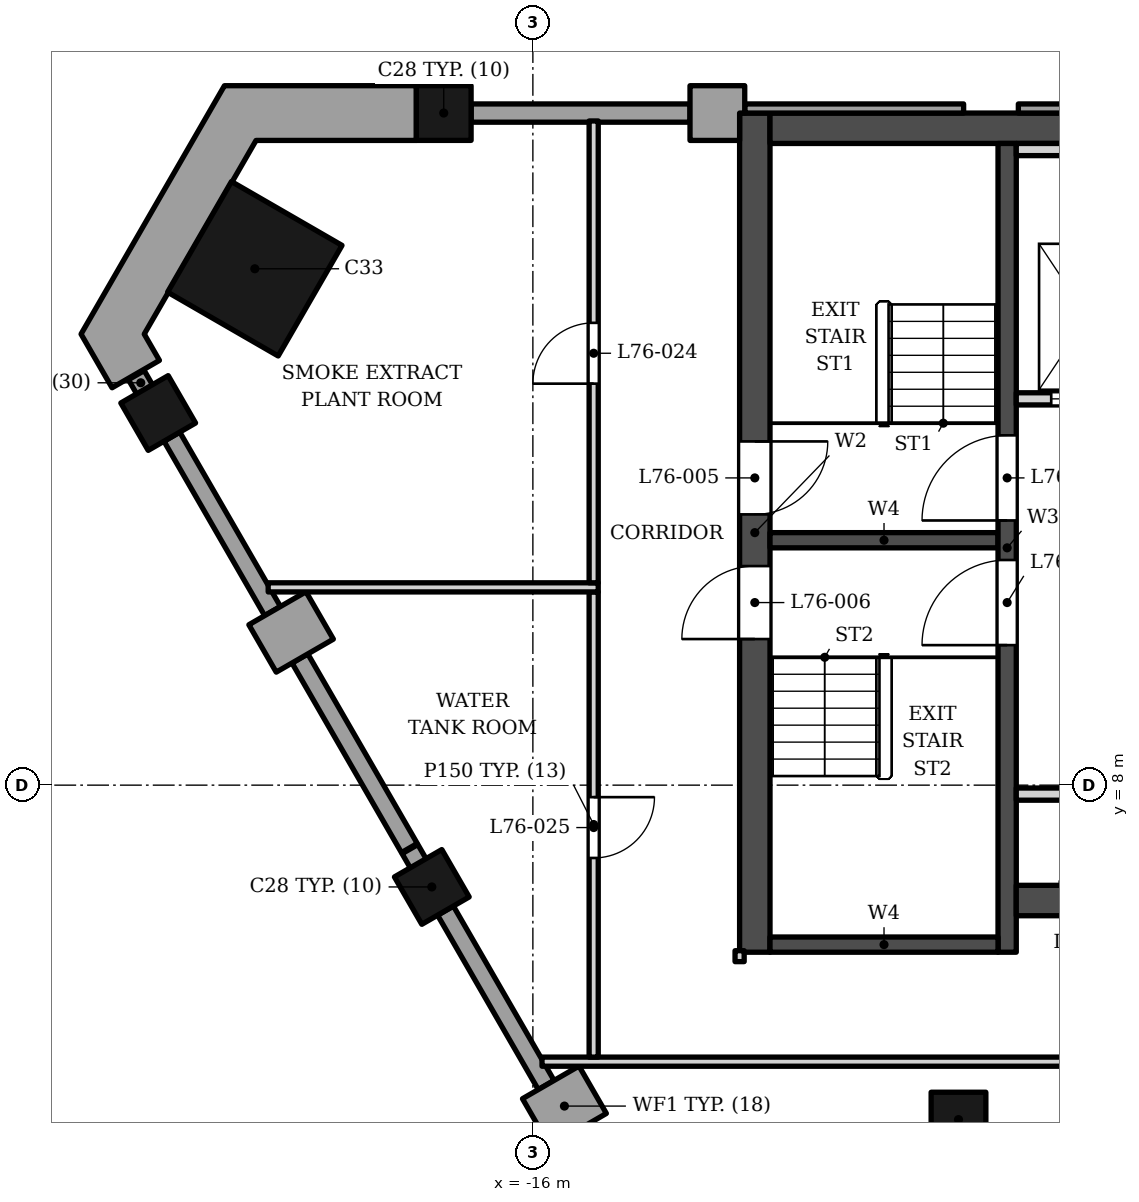
"""IFC4 building model, lengths in metres.
Left out: names, types, materials, properties, quantities, classifications, styles, units other than length and angle.
Written with IfcOpenShell. Run it as: python <this file> out.ifc"""

import sys

from ifc_helpers import new_model, si_unit, direction, frame, frame_2d, origin, origin_2d, place, context, subcontext, project, spatial, polyline, rectangle, outline, extrude, element, fill, save


model = new_model("IFC4")
c1 = context("Model", 3, precision=1e-05, world=origin(), true_north=direction((0.0, 1.0)))
c2 = subcontext(c1, "Body", "Model", "MODEL_VIEW")
j1 = project(units=[si_unit("LENGTHUNIT", "METRE"), si_unit("PLANEANGLEUNIT", "RADIAN")], contexts=[c1])
p1 = place(None, origin())
s1 = spatial("IfcSite", under=j1, at=p1, CompositionType="ELEMENT")
p2 = place(p1, origin())
s2 = spatial("IfcBuilding", under=s1, at=p2, CompositionType="ELEMENT")
p3 = place(p2, frame((0.0, 0.0, 325.5)))
s3 = spatial("IfcBuildingStorey", under=s2, at=p3, CompositionType="ELEMENT", Elevation=325.5)
p4 = place(p3, frame((-12.1, 18.802, 0.0), z_axis=(0.0, 0.0, 1.0), x_axis=(1.0, 0.0, 0.0)))
e1 = element("IfcWall", 1, at=p4, inside=s3, PredefinedType="SHEAR", context=c2, shape_type="SweptSolid", body=[
    extrude(rectangle(XDim=24.2, YDim=0.5, at=frame_2d((12.1, 0.0))), origin(), (0.0, 0.0, 1.0), 5.0),
])
p5 = place(p3, frame((-12.35, 5.253, 0.0), z_axis=(0.0, 0.0, 1.0), x_axis=(0.0, 1.0, 0.0)))
e2 = element("IfcWall", 2, at=p5, inside=s3, PredefinedType="SHEAR", context=c2, shape_type="SweptSolid", body=[
    extrude(rectangle(XDim=13.8, YDim=0.5, at=frame_2d((6.9, 0.0))), origin(), (0.0, 0.0, 1.0), 5.0),
])
p6 = place(p5, frame((7.2, 0.0, 0.0)))
e3 = element("IfcOpeningElement", 3, at=p6, cuts=e2, PredefinedType="OPENING", context=c2, shape_type="SweptSolid", body=[
    extrude(rectangle(XDim=1.2, YDim=2.1, at=frame_2d((0.6, 1.05))), frame((0.0, 0.26, 0.0), z_axis=(0.0, -1.0, 0.0), x_axis=(1.0, 0.0, 0.0)), (0.0, 0.0, 1.0), 0.52),
])
p7 = place(p5, frame((5.15, 0.0, 0.0)))
e4 = element("IfcOpeningElement", 4, at=p7, cuts=e2, PredefinedType="OPENING", context=c2, shape_type="SweptSolid", body=[
    extrude(rectangle(XDim=1.2, YDim=2.1, at=frame_2d((0.6, 1.05))), frame((0.0, 0.26, 0.0), z_axis=(0.0, -1.0, 0.0), x_axis=(1.0, 0.0, 0.0)), (0.0, 0.0, 1.0), 0.52),
])
p8 = place(p3, frame((-8.2, 5.253, 0.0), z_axis=(0.0, 0.0, 1.0), x_axis=(0.0, 1.0, 0.0)))
e5 = element("IfcWall", 5, at=p8, inside=s3, PredefinedType="SHEAR", context=c2, shape_type="SweptSolid", body=[
    extrude(rectangle(XDim=13.3, YDim=0.3, at=frame_2d((6.65, 0.0))), origin(), (0.0, 0.0, 1.0), 5.0),
])
p9 = place(p8, frame((7.1, 0.0, 0.0)))
e6 = element("IfcOpeningElement", 6, at=p9, cuts=e5, PredefinedType="OPENING", context=c2, shape_type="SweptSolid", body=[
    extrude(rectangle(XDim=1.4, YDim=2.1, at=frame_2d((0.7, 1.05))), frame((0.0, 0.16, 0.0), z_axis=(0.0, -1.0, 0.0), x_axis=(1.0, 0.0, 0.0)), (0.0, 0.0, 1.0), 0.32),
])
p10 = place(p8, frame((5.05, 0.0, 0.0)))
e7 = element("IfcOpeningElement", 7, at=p10, cuts=e5, PredefinedType="OPENING", context=c2, shape_type="SweptSolid", body=[
    extrude(rectangle(XDim=1.4, YDim=2.1, at=frame_2d((0.7, 1.05))), frame((0.0, 0.16, 0.0), z_axis=(0.0, -1.0, 0.0), x_axis=(1.0, 0.0, 0.0)), (0.0, 0.0, 1.0), 0.32),
])
for number, where, z_axis, x_axis in (
    (8, (-12.1, 12.028, 0.0), (0.0, 0.0, 1.0), (1.0, 0.0, 0.0)),
    (9, (-12.1, 5.378, 0.0), (0.0, 0.0, 1.0), (1.0, 0.0, 0.0)),
):
    element("IfcWall", number, at=place(p3, frame(where, z_axis=z_axis, x_axis=x_axis)), inside=s3, PredefinedType="SHEAR", context=c2, shape_type="SweptSolid", body=[
        extrude(rectangle(XDim=3.75, YDim=0.25, at=frame_2d((1.875, 0.0))), origin(), (0.0, 0.0, 1.0), 5.0),
    ])
p11 = place(p3, frame((-8.05, 6.103, 0.0), z_axis=(0.0, 0.0, 1.0), x_axis=(1.0, 0.0, 0.0)))
e10 = element("IfcWall", 10, at=p11, inside=s3, PredefinedType="SHEAR", context=c2, shape_type="SweptSolid", body=[
    extrude(rectangle(XDim=7.05, YDim=0.5, at=frame_2d((3.525, 0.0))), origin(), (0.0, 0.0, 1.0), 5.0),
])
p12 = place(p11, frame((0.825, 0.0, 0.0)))
e11 = element("IfcOpeningElement", 11, at=p12, cuts=e10, PredefinedType="OPENING", context=c2, shape_type="SweptSolid", body=[
    extrude(rectangle(XDim=0.9, YDim=2.1, at=frame_2d((0.45, 1.05))), frame((0.0, 0.26, 0.0), z_axis=(0.0, -1.0, 0.0), x_axis=(1.0, 0.0, 0.0)), (0.0, 0.0, 1.0), 0.52),
])
p13 = place(p3, frame((-20.573, 16.492, 0.0), z_axis=(0.0, 0.0, 1.0), x_axis=(0.866025395058, -0.500000015115, 0.0)))
e12 = element("IfcColumn", 12, at=p13, inside=s3, PredefinedType="COLUMN", context=c2, shape_type="SweptSolid", body=[
    extrude(rectangle(XDim=2.1, YDim=2.1, at=origin_2d()), origin(), (0.0, 0.0, 1.0), 5.0),
])
for number, where, z_axis, x_axis in (
    (13, (-9.0, 2.5, 0.0), (0.0, 0.0, 1.0), (1.0, 0.0, 0.0)),
    (14, (-22.162, 14.12, 0.0), (0.0, 0.0, 1.0), (0.5, -0.866, 0.0)),
    (15, (-17.662, 6.326, 0.0), (0.0, 0.0, 1.0), (0.5, -0.866, 0.0)),
    (16, (-17.466, 19.053, 0.0), (0.0, 0.0, 1.0), (-1.0, 0.0, 0.0)),
):
    element("IfcColumn", number, at=place(p3, frame(where, z_axis=z_axis, x_axis=x_axis)), inside=s3, PredefinedType="COLUMN", context=c2, shape_type="SweptSolid", body=[
        extrude(rectangle(XDim=0.9, YDim=0.9, at=origin_2d()), origin(), (0.0, 0.0, 1.0), 5.0),
    ])
p14 = place(p3, frame((-20.446, 10.248, 0.0), z_axis=(0.0, 0.0, 1.0), x_axis=(0.866103179807, 0.499865263774, 0.0)))
e17 = element("IfcWall", 17, at=p14, inside=s3, PredefinedType="SOLIDWALL", context=c2, shape_type="SweptSolid", body=[
    extrude(rectangle(XDim=1.085, YDim=0.9, at=frame_2d((0.542, 0.0))), origin(), (0.0, 0.0, 1.0), 3.8),
])
p15 = place(p3, frame((-15.946, 2.454, 0.0), z_axis=(0.0, 0.0, 1.0), x_axis=(0.86613636825, 0.499807754637, 0.0)))
e18 = element("IfcWall", 18, at=p15, inside=s3, PredefinedType="SOLIDWALL", context=c2, shape_type="SweptSolid", body=[
    extrude(rectangle(XDim=1.074, YDim=0.9, at=frame_2d((0.537, 0.0))), origin(), (0.0, 0.0, 1.0), 3.8),
])
p16 = place(p3, origin())
e19 = element("IfcWall", 19, at=p16, inside=s3, PredefinedType="ELEMENTEDWALL", context=c2, shape_type="SweptSolid", body=[
    extrude(outline(polyline([(-20.151, 10.938), (-21.807, 13.805), (-22.067, 13.655), (-20.411, 10.788), (-20.151, 10.938)])), origin(), (0.0, 0.0, 1.0), 3.8),
])
p17 = place(p3, frame((-19.831, 10.083, 0.0), z_axis=(0.0, 0.0, 1.0), x_axis=(0.500012057535, -0.866018442252, 0.0)))
e20 = element("IfcWall", 20, at=p17, inside=s3, PredefinedType="ELEMENTEDWALL", context=c2, shape_type="SweptSolid", body=[
    extrude(rectangle(XDim=3.6, YDim=0.3, at=frame_2d((1.8, 0.0))), origin(), (0.0, 0.0, 1.0), 3.8),
])
p18 = place(p3, origin())
e21 = element("IfcWall", 21, at=p18, inside=s3, PredefinedType="ELEMENTEDWALL", context=c2, shape_type="SweptSolid", body=[
    extrude(outline(polyline([(-15.651, 3.144), (-17.307, 6.011), (-17.567, 5.861), (-15.911, 2.994), (-15.651, 3.144)])), origin(), (0.0, 0.0, 1.0), 3.8),
])
p19 = place(p3, origin())
e22 = element("IfcWall", 22, at=p19, inside=s3, PredefinedType="SOLIDWALL", context=c2, shape_type="SweptSolid", body=[
    extrude(outline(polyline([(-13.416, 19.502), (-13.416, 18.603), (-12.6, 18.603), (-12.6, 19.052), (-12.516, 19.052), (-12.516, 19.502), (-13.416, 19.502)])), origin(), (0.0, 0.0, 1.0), 3.8),
])
p20 = place(p3, origin())
e23 = element("IfcWall", 23, at=p20, inside=s3, PredefinedType="ELEMENTEDWALL", context=c2, shape_type="SweptSolid", body=[
    extrude(outline(polyline([(-4.416, 19.203), (-8.016, 19.203), (-8.016, 19.052), (-4.416, 19.052), (-4.416, 19.203)])), origin(), (0.0, 0.0, 1.0), 3.8),
])
p21 = place(p3, origin())
e24 = element("IfcWall", 24, at=p21, inside=s3, PredefinedType="ELEMENTEDWALL", context=c2, shape_type="SweptSolid", body=[
    extrude(outline(polyline([(-8.916, 19.203), (-12.516, 19.203), (-12.516, 19.052), (-8.916, 19.052), (-8.916, 19.203)])), origin(), (0.0, 0.0, 1.0), 3.8),
])
p22 = place(p3, frame((-13.416, 19.052, 0.0), z_axis=(0.0, 0.0, 1.0), x_axis=(-1.0, 0.0, 0.0)))
e25 = element("IfcWall", 25, at=p22, inside=s3, PredefinedType="ELEMENTEDWALL", context=c2, shape_type="SweptSolid", body=[
    extrude(rectangle(XDim=3.6, YDim=0.3, at=frame_2d((1.8, 0.0))), origin(), (0.0, 0.0, 1.0), 3.8),
])
p23 = place(p3, origin())
e26 = element("IfcWall", 26, at=p23, inside=s3, PredefinedType="SOLIDWALL", context=c2, shape_type="SweptSolid", body=[
    extrude(outline(polyline([(-17.916, 18.603), (-17.916, 19.502), (-21.073, 19.502), (-23.431, 15.418), (-22.921, 14.535), (-22.142, 14.985), (-22.392, 15.418), (-20.553, 18.603), (-17.916, 18.603)])), origin(), (0.0, 0.0, 1.0), 3.8),
])
for number, where, z_axis, x_axis in (
    (27, (-22.579, 14.542, 0.0), (0.0, 0.0, 1.0), (0.866, 0.5, 0.0)),
    (28, (-18.079, 6.748, 0.0), (0.0, 0.0, 1.0), (0.866, 0.5, 0.0)),
):
    element("IfcWall", number, at=place(p3, frame(where, z_axis=z_axis, x_axis=x_axis)), inside=s3, PredefinedType="ELEMENTEDWALL", context=c2, shape_type="SweptSolid", body=[
        extrude(rectangle(XDim=0.3, YDim=0.29, at=frame_2d((0.15, 0.0))), origin(), (0.0, 0.0, 1.0), 3.8),
    ])
p24 = place(p3, frame((-8.05, 7.853, 0.0), z_axis=(0.0, 0.0, 1.0), x_axis=(1.0, 0.0, 0.0)))
e29 = element("IfcWall", 29, at=p24, inside=s3, PredefinedType="SOLIDWALL", context=c2, shape_type="SweptSolid", body=[
    extrude(rectangle(XDim=2.45, YDim=0.2, at=frame_2d((1.225, 0.0))), origin(), (0.0, 0.0, 1.0), 4.8),
])
p25 = place(p3, frame((-8.05, 14.353, 0.0), z_axis=(0.0, 0.0, 1.0), x_axis=(1.0, 0.0, 0.0)))
e30 = element("IfcWall", 30, at=p25, inside=s3, PredefinedType="SOLIDWALL", context=c2, shape_type="SweptSolid", body=[
    extrude(rectangle(XDim=2.55, YDim=0.2, at=frame_2d((1.275, 0.0))), origin(), (0.0, 0.0, 1.0), 4.8),
])
p26 = place(p25, frame((0.575, 0.0, 0.0)))
e31 = element("IfcOpeningElement", 31, at=p26, cuts=e30, PredefinedType="OPENING", context=c2, shape_type="SweptSolid", body=[
    extrude(rectangle(XDim=1.2, YDim=2.1, at=frame_2d((0.6, 1.05))), frame((0.0, 0.11, 0.0), z_axis=(0.0, -1.0, 0.0), x_axis=(1.0, 0.0, 0.0)), (0.0, 0.0, 1.0), 0.22),
])
p27 = place(p3, frame((-8.05, 18.453, 0.0), z_axis=(0.0, 0.0, 1.0), x_axis=(1.0, 0.0, 0.0)))
e32 = element("IfcWall", 32, at=p27, inside=s3, PredefinedType="SOLIDWALL", context=c2, shape_type="SweptSolid", body=[
    extrude(rectangle(XDim=2.55, YDim=0.2, at=frame_2d((1.275, 0.0))), origin(), (0.0, 0.0, 1.0), 4.8),
])
p28 = place(p3, frame((-15.85, 3.453, 0.0), z_axis=(0.0, 0.0, 1.0), x_axis=(1.0, 0.0, 0.0)))
e33 = element("IfcWall", 33, at=p28, inside=s3, PredefinedType="PARTITIONING", context=c2, shape_type="SweptSolid", body=[
    extrude(rectangle(XDim=17.755, YDim=0.15, at=frame_2d((8.877, 0.0))), origin(), (0.0, 0.0, 1.0), 4.402),
])
p29 = place(p28, frame((10.05, 0.0, 0.0)))
e34 = element("IfcOpeningElement", 34, at=p29, cuts=e33, PredefinedType="OPENING", context=c2, shape_type="SweptSolid", body=[
    extrude(rectangle(XDim=1.0, YDim=2.1, at=frame_2d((0.5, 1.05))), frame((0.0, 0.085, 0.0), z_axis=(0.0, -1.0, 0.0), x_axis=(1.0, 0.0, 0.0)), (0.0, 0.0, 1.0), 0.17),
])
p30 = place(p3, frame((-15.0, 3.528, 0.0), z_axis=(0.0, 0.0, 1.0), x_axis=(0.0, 1.0, 0.0)))
e35 = element("IfcWall", 35, at=p30, inside=s3, PredefinedType="PARTITIONING", context=c2, shape_type="SweptSolid", body=[
    extrude(rectangle(XDim=7.65, YDim=0.15, at=frame_2d((3.825, 0.0))), origin(), (0.0, 0.0, 1.0), 4.02),
])
p31 = place(p30, frame((3.275, 0.0, 0.0)))
e36 = element("IfcOpeningElement", 36, at=p31, cuts=e35, PredefinedType="OPENING", context=c2, shape_type="SweptSolid", body=[
    extrude(rectangle(XDim=1.0, YDim=2.1, at=frame_2d((0.5, 1.05))), frame((0.0, 0.085, 0.0), z_axis=(0.0, -1.0, 0.0), x_axis=(1.0, 0.0, 0.0)), (0.0, 0.0, 1.0), 0.17),
])
p32 = place(p3, frame((-12.6, 5.098, 0.0), z_axis=(0.0, 0.0, 1.0), x_axis=(0.0, 1.0, 0.0)))
e37 = element("IfcWall", 37, at=p32, inside=s3, PredefinedType="PARTITIONING", context=c2, shape_type="SweptSolid", body=[
    extrude(rectangle(XDim=0.18, YDim=0.15, at=frame_2d((0.09, 0.0))), origin(), (0.0, 0.0, 1.0), 4.8),
])
p33 = place(p3, frame((-20.353, 11.253, 0.0), z_axis=(0.0, 0.0, 1.0), x_axis=(1.0, 0.0, 0.0)))
e38 = element("IfcWall", 38, at=p33, inside=s3, PredefinedType="PARTITIONING", context=c2, shape_type="SweptSolid", body=[
    extrude(rectangle(XDim=5.428, YDim=0.15, at=frame_2d((2.714, 0.0))), origin(), (0.0, 0.0, 1.0), 4.1),
])
p34 = place(p3, frame((-15.0, 11.328, 0.0), z_axis=(0.0, 0.0, 1.0), x_axis=(0.0, 1.0, 0.0)))
e39 = element("IfcWall", 39, at=p34, inside=s3, PredefinedType="PARTITIONING", context=c2, shape_type="SweptSolid", body=[
    extrude(rectangle(XDim=7.595, YDim=0.15, at=frame_2d((3.797, 0.0))), origin(), (0.0, 0.0, 1.0), 4.8),
])
p35 = place(p34, frame((3.275, 0.0, 0.0)))
e40 = element("IfcOpeningElement", 40, at=p35, cuts=e39, PredefinedType="OPENING", context=c2, shape_type="SweptSolid", body=[
    extrude(rectangle(XDim=1.0, YDim=2.1, at=frame_2d((0.5, 1.05))), frame((0.0, 0.085, 0.0), z_axis=(0.0, -1.0, 0.0), x_axis=(1.0, 0.0, 0.0)), (0.0, 0.0, 1.0), 0.17),
])
p36 = place(p26, origin())
e41 = element("IfcDoor", 41, at=p36, inside=s3, OperationType="DOUBLE_DOOR_SLIDING", PredefinedType="DOOR", context=c2, shape_type="SweptSolid", body=[
    extrude(rectangle(XDim=1.2, YDim=2.1, at=frame_2d((0.6, 1.05))), frame((0.0, 0.025, 0.0), z_axis=(0.0, -1.0, 0.0), x_axis=(1.0, 0.0, 0.0)), (0.0, 0.0, 1.0), 0.05),
])
fill(e31, e41)
p37 = place(p9, origin())
e42 = element("IfcDoor", 42, at=p37, inside=s3, OperationType="SINGLE_SWING_LEFT", PredefinedType="DOOR", context=c2, shape_type="SweptSolid", body=[
    extrude(rectangle(XDim=1.4, YDim=2.1, at=frame_2d((0.7, 1.05))), frame((0.0, 0.025, 0.0), z_axis=(0.0, -1.0, 0.0), x_axis=(1.0, 0.0, 0.0)), (0.0, 0.0, 1.0), 0.05),
])
fill(e6, e42)
p38 = place(p10, origin())
e43 = element("IfcDoor", 43, at=p38, inside=s3, OperationType="SINGLE_SWING_LEFT", PredefinedType="DOOR", context=c2, shape_type="SweptSolid", body=[
    extrude(rectangle(XDim=1.4, YDim=2.1, at=frame_2d((0.7, 1.05))), frame((0.0, 0.025, 0.0), z_axis=(0.0, -1.0, 0.0), x_axis=(1.0, 0.0, 0.0)), (0.0, 0.0, 1.0), 0.05),
])
fill(e7, e43)
p39 = place(p6, origin())
e44 = element("IfcDoor", 44, at=p39, inside=s3, OperationType="SINGLE_SWING_RIGHT", PredefinedType="DOOR", context=c2, shape_type="SweptSolid", body=[
    extrude(rectangle(XDim=1.2, YDim=2.1, at=frame_2d((0.6, 1.05))), frame((0.0, 0.025, 0.0), z_axis=(0.0, -1.0, 0.0), x_axis=(1.0, 0.0, 0.0)), (0.0, 0.0, 1.0), 0.05),
])
fill(e3, e44)
p40 = place(p7, origin())
e45 = element("IfcDoor", 45, at=p40, inside=s3, OperationType="SINGLE_SWING_LEFT", PredefinedType="DOOR", context=c2, shape_type="SweptSolid", body=[
    extrude(rectangle(XDim=1.2, YDim=2.1, at=frame_2d((0.6, 1.05))), frame((0.0, 0.025, 0.0), z_axis=(0.0, -1.0, 0.0), x_axis=(1.0, 0.0, 0.0)), (0.0, 0.0, 1.0), 0.05),
])
fill(e4, e45)
p41 = place(p35, origin())
e46 = element("IfcDoor", 46, at=p41, inside=s3, OperationType="SINGLE_SWING_LEFT", PredefinedType="DOOR", context=c2, shape_type="SweptSolid", body=[
    extrude(rectangle(XDim=1.0, YDim=2.1, at=frame_2d((0.5, 1.05))), frame((0.0, 0.025, 0.0), z_axis=(0.0, -1.0, 0.0), x_axis=(1.0, 0.0, 0.0)), (0.0, 0.0, 1.0), 0.05),
])
fill(e40, e46)
p42 = place(p31, origin())
e47 = element("IfcDoor", 47, at=p42, inside=s3, OperationType="SINGLE_SWING_RIGHT", PredefinedType="DOOR", context=c2, shape_type="SweptSolid", body=[
    extrude(rectangle(XDim=1.0, YDim=2.1, at=frame_2d((0.5, 1.05))), frame((0.0, 0.025, 0.0), z_axis=(0.0, -1.0, 0.0), x_axis=(1.0, 0.0, 0.0)), (0.0, 0.0, 1.0), 0.05),
])
fill(e36, e47)
save(model, sys.argv[1])
